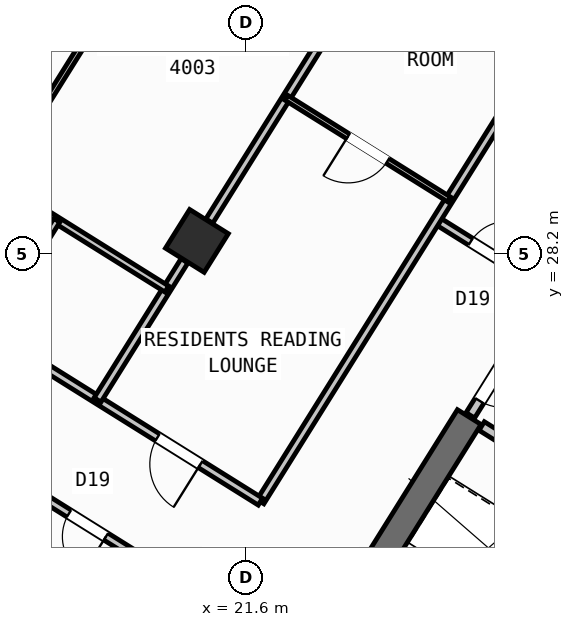
"""IFC4 building model, lengths in metres.
Left out: names, types, materials, properties, quantities, classifications, styles, units other than length and angle.
Written with IfcOpenShell. Run it as: python <this file> out.ifc"""

import sys

from ifc_helpers import new_model, si_unit, direction, frame, frame_2d, origin, origin_2d, place, context, subcontext, project, spatial, rectangle, hollow_rectangle, extrude, source, transform, mapped, element, fill, save


model = new_model("IFC4")
c1 = context("Model", 3, precision=1e-05, world=origin(), true_north=direction((0.0, 1.0)))
c2 = subcontext(c1, "Body", "Model", "MODEL_VIEW")
j1 = project(units=[si_unit("LENGTHUNIT", "METRE"), si_unit("PLANEANGLEUNIT", "RADIAN")], contexts=[c1])
p1 = place(None, origin())
s1 = spatial("IfcSite", under=j1, at=p1, CompositionType="ELEMENT")
p2 = place(p1, origin())
s2 = spatial("IfcBuilding", under=s1, at=p2, CompositionType="ELEMENT")
p3 = place(p2, frame((0.0, 0.0, 158.7)))
s3 = spatial("IfcBuildingStorey", under=s2, at=p3, CompositionType="ELEMENT", Elevation=158.7)
p4 = place(p3, frame((26.007, 24.976, 0.0), z_axis=(0.0, 0.0, 1.0), x_axis=(-0.529923795287, -0.848045264823, 0.0)))
e1 = element("IfcWall", 1, at=p4, inside=s3, PredefinedType="SHEAR", context=c2, shape_type="SweptSolid", body=[
    extrude(rectangle(XDim=6.425, YDim=0.55, at=frame_2d((3.212, 0.0))), origin(), (0.0, 0.0, 1.0), 3.35),
])
m1 = source(origin(), c2, "Body", "SweptSolid", [
    extrude(hollow_rectangle(XDim=0.9, YDim=0.9, WallThickness=0.036, at=origin_2d()), origin(), (0.0, 0.0, 1.0), 3.6),
])
p5 = place(p3, frame((20.632, 28.452, 0.0), z_axis=(0.0, 0.0, 1.0), x_axis=(-0.848048096156, 0.529919264233, 0.0)))
e2 = element("IfcColumn", 2, at=p5, inside=s3, PredefinedType="COLUMN", context=c2, shape_type="MappedRepresentation", body=[
    mapped(m1, transform((0.0, 0.0, 0.0), scale=1.0)),
])
p6 = place(p3, frame((29.268, 6.429, 0.0), z_axis=(0.0, 0.0, 1.0), x_axis=(-0.848049971435, 0.529916263149, 0.0)))
e3 = element("IfcWall", 3, at=p6, inside=s3, PredefinedType="STANDARD", context=c2, shape_type="SweptSolid", body=[
    extrude(rectangle(XDim=31.588, YDim=0.32, at=frame_2d((15.794, 0.0))), origin(), (0.0, 0.0, 1.0), 3.35),
])
p7 = place(p6, frame((16.362, 0.0, 0.0)))
e4 = element("IfcOpeningElement", 4, at=p7, cuts=e3, PredefinedType="OPENING", context=c2, shape_type="SweptSolid", body=[
    extrude(rectangle(XDim=1.2, YDim=2.15, at=frame_2d((0.6, 1.075))), frame((0.0, 0.17, 0.0), z_axis=(0.0, -1.0, 0.0), x_axis=(1.0, 0.0, 0.0)), (0.0, 0.0, 1.0), 0.34),
])
p8 = place(p6, frame((2.989, 0.0, 0.8)))
e5 = element("IfcOpeningElement", 5, at=p8, cuts=e3, PredefinedType="OPENING", context=c2, shape_type="SweptSolid", body=[
    extrude(rectangle(XDim=2.1, YDim=1.55, at=frame_2d((1.05, 0.775))), frame((0.0, 0.17, 0.0), z_axis=(0.0, -1.0, 0.0), x_axis=(1.0, 0.0, 0.0)), (0.0, 0.0, 1.0), 0.34),
])
p9 = place(p6, frame((8.359, 0.0, 0.8)))
e6 = element("IfcOpeningElement", 6, at=p9, cuts=e3, PredefinedType="OPENING", context=c2, shape_type="SweptSolid", body=[
    extrude(rectangle(XDim=2.1, YDim=1.55, at=frame_2d((1.05, 0.775))), frame((0.0, 0.17, 0.0), z_axis=(0.0, -1.0, 0.0), x_axis=(1.0, 0.0, 0.0)), (0.0, 0.0, 1.0), 0.34),
])
p10 = place(p6, frame((13.284, 0.0, 0.95)))
e7 = element("IfcOpeningElement", 7, at=p10, cuts=e3, PredefinedType="OPENING", context=c2, shape_type="SweptSolid", body=[
    extrude(rectangle(XDim=1.2, YDim=1.4, at=frame_2d((0.6, 0.7))), frame((0.0, 0.17, 0.0), z_axis=(0.0, -1.0, 0.0), x_axis=(1.0, 0.0, 0.0)), (0.0, 0.0, 1.0), 0.34),
])
p11 = place(p6, frame((20.259, 0.0, 0.95)))
e8 = element("IfcOpeningElement", 8, at=p11, cuts=e3, PredefinedType="OPENING", context=c2, shape_type="SweptSolid", body=[
    extrude(rectangle(XDim=1.2, YDim=1.4, at=frame_2d((0.6, 0.7))), frame((0.0, 0.17, 0.0), z_axis=(0.0, -1.0, 0.0), x_axis=(1.0, 0.0, 0.0)), (0.0, 0.0, 1.0), 0.34),
])
p12 = place(p6, frame((22.929, 0.0, 0.95)))
e9 = element("IfcOpeningElement", 9, at=p12, cuts=e3, PredefinedType="OPENING", context=c2, shape_type="SweptSolid", body=[
    extrude(rectangle(XDim=1.2, YDim=1.4, at=frame_2d((0.6, 0.7))), frame((0.0, 0.17, 0.0), z_axis=(0.0, -1.0, 0.0), x_axis=(1.0, 0.0, 0.0)), (0.0, 0.0, 1.0), 0.34),
])
p13 = place(p6, frame((27.481, 0.0, 0.8)))
e10 = element("IfcOpeningElement", 10, at=p13, cuts=e3, PredefinedType="OPENING", context=c2, shape_type="SweptSolid", body=[
    extrude(rectangle(XDim=2.1, YDim=1.55, at=frame_2d((1.05, 0.775))), frame((0.0, 0.17, 0.0), z_axis=(0.0, -1.0, 0.0), x_axis=(1.0, 0.0, 0.0)), (0.0, 0.0, 1.0), 0.34),
])
p14 = place(p3, frame((14.138, 41.825, 0.0), z_axis=(0.0, 0.0, 1.0), x_axis=(0.848046498049, -0.529921821731, 0.0)))
e11 = element("IfcWall", 11, at=p14, inside=s3, PredefinedType="STANDARD", context=c2, shape_type="SweptSolid", body=[
    extrude(rectangle(XDim=31.588, YDim=0.32, at=frame_2d((15.794, 0.0))), origin(), (0.0, 0.0, 1.0), 3.35),
])
p15 = place(p14, frame((9.792, 0.0, 0.0)))
e12 = element("IfcOpeningElement", 12, at=p15, cuts=e11, PredefinedType="OPENING", context=c2, shape_type="SweptSolid", body=[
    extrude(rectangle(XDim=1.05, YDim=2.15, at=frame_2d((0.525, 1.075))), frame((0.0, 0.17, 0.0), z_axis=(0.0, -1.0, 0.0), x_axis=(1.0, 0.0, 0.0)), (0.0, 0.0, 1.0), 0.34),
])
p16 = place(p14, frame((0.791, 0.0, 0.85)))
e13 = element("IfcOpeningElement", 13, at=p16, cuts=e11, PredefinedType="OPENING", context=c2, shape_type="SweptSolid", body=[
    extrude(rectangle(XDim=1.8, YDim=1.5, at=frame_2d((0.9, 0.75))), frame((0.0, 0.17, 0.0), z_axis=(0.0, -1.0, 0.0), x_axis=(1.0, 0.0, 0.0)), (0.0, 0.0, 1.0), 0.34),
])
p17 = place(p14, frame((3.996, 0.0, 0.95)))
e14 = element("IfcOpeningElement", 14, at=p17, cuts=e11, PredefinedType="OPENING", context=c2, shape_type="SweptSolid", body=[
    extrude(rectangle(XDim=1.2, YDim=1.4, at=frame_2d((0.6, 0.7))), frame((0.0, 0.17, 0.0), z_axis=(0.0, -1.0, 0.0), x_axis=(1.0, 0.0, 0.0)), (0.0, 0.0, 1.0), 0.34),
])
p18 = place(p14, frame((13.874, 0.0, 0.85)))
e15 = element("IfcOpeningElement", 15, at=p18, cuts=e11, PredefinedType="OPENING", context=c2, shape_type="SweptSolid", body=[
    extrude(rectangle(XDim=1.5, YDim=1.5, at=frame_2d((0.75, 0.75))), frame((0.0, 0.17, 0.0), z_axis=(0.0, -1.0, 0.0), x_axis=(1.0, 0.0, 0.0)), (0.0, 0.0, 1.0), 0.34),
])
p19 = place(p14, frame((17.104, 0.0, 1.0)))
e16 = element("IfcOpeningElement", 16, at=p19, cuts=e11, PredefinedType="OPENING", context=c2, shape_type="SweptSolid", body=[
    extrude(rectangle(XDim=0.9, YDim=1.25, at=frame_2d((0.45, 0.625))), frame((0.0, 0.17, 0.0), z_axis=(0.0, -1.0, 0.0), x_axis=(1.0, 0.0, 0.0)), (0.0, 0.0, 1.0), 0.34),
])
p20 = place(p14, frame((22.144, 0.0, 1.0)))
e17 = element("IfcOpeningElement", 17, at=p20, cuts=e11, PredefinedType="OPENING", context=c2, shape_type="SweptSolid", body=[
    extrude(rectangle(XDim=0.9, YDim=1.25, at=frame_2d((0.45, 0.625))), frame((0.0, 0.17, 0.0), z_axis=(0.0, -1.0, 0.0), x_axis=(1.0, 0.0, 0.0)), (0.0, 0.0, 1.0), 0.34),
])
p21 = place(p14, frame((27.744, 0.0, 1.0)))
e18 = element("IfcOpeningElement", 18, at=p21, cuts=e11, PredefinedType="OPENING", context=c2, shape_type="SweptSolid", body=[
    extrude(rectangle(XDim=0.9, YDim=1.25, at=frame_2d((0.45, 0.625))), frame((0.0, 0.17, 0.0), z_axis=(0.0, -1.0, 0.0), x_axis=(1.0, 0.0, 0.0)), (0.0, 0.0, 1.0), 0.34),
])
p22 = place(p3, frame((31.525, 21.504, 0.0), z_axis=(0.0, 0.0, 1.0), x_axis=(-0.848040211232, 0.529931882541, 0.0)))
e19 = element("IfcWall", 19, at=p22, inside=s3, PredefinedType="STANDARD", context=c2, shape_type="SweptSolid", body=[
    extrude(rectangle(XDim=6.218, YDim=0.2, at=frame_2d((3.109, 0.0))), origin(), (0.0, 0.0, 1.0), 3.34),
])
p23 = place(p22, frame((4.4, 0.0, 0.0)))
e20 = element("IfcOpeningElement", 20, at=p23, cuts=e19, PredefinedType="OPENING", context=c2, shape_type="SweptSolid", body=[
    extrude(rectangle(XDim=0.86, YDim=2.05, at=frame_2d((0.43, 1.025))), frame((0.0, 0.11, 0.0), z_axis=(0.0, -1.0, 0.0), x_axis=(1.0, 0.0, 0.0)), (0.0, 0.0, 1.0), 0.22),
])
p24 = place(p22, frame((0.35, 0.0, 0.0)))
e21 = element("IfcOpeningElement", 21, at=p24, cuts=e19, PredefinedType="OPENING", context=c2, shape_type="SweptSolid", body=[
    extrude(rectangle(XDim=0.86, YDim=2.05, at=frame_2d((0.43, 1.025))), frame((0.0, 0.11, 0.0), z_axis=(0.0, -1.0, 0.0), x_axis=(1.0, 0.0, 0.0)), (0.0, 0.0, 1.0), 0.22),
])
p25 = place(p3, frame((27.596, 27.52, 0.0), z_axis=(0.0, 0.0, 1.0), x_axis=(-0.529865479138, -0.848081702443, 0.0)))
e22 = element("IfcWall", 22, at=p25, inside=s3, PredefinedType="STANDARD", context=c2, shape_type="SweptSolid", body=[
    extrude(rectangle(XDim=2.96, YDim=0.2, at=frame_2d((1.48, 0.0))), origin(), (0.0, 0.0, 1.0), 3.34),
])
p26 = place(p25, frame((1.76, 0.0, 0.0)))
e23 = element("IfcOpeningElement", 23, at=p26, cuts=e22, PredefinedType="OPENING", context=c2, shape_type="SweptSolid", body=[
    extrude(rectangle(XDim=0.86, YDim=2.05, at=frame_2d((0.43, 1.025))), frame((0.0, 0.11, 0.0), z_axis=(0.0, -1.0, 0.0), x_axis=(1.0, 0.0, 0.0)), (0.0, 0.0, 1.0), 0.22),
])
p27 = place(p3, frame((27.57, 27.478, 0.0), z_axis=(0.0, 0.0, 1.0), x_axis=(-0.848050851465, 0.529914854792, 0.0)))
e24 = element("IfcWall", 24, at=p27, inside=s3, PredefinedType="PARTITIONING", context=c2, shape_type="SweptSolid", body=[
    extrude(rectangle(XDim=2.61, YDim=0.16, at=frame_2d((1.305, 0.0))), origin(), (0.0, 0.0, 1.0), 3.34),
])
p28 = place(p27, frame((0.95, 0.0, 0.0)))
e25 = element("IfcOpeningElement", 25, at=p28, cuts=e24, PredefinedType="OPENING", context=c2, shape_type="SweptSolid", body=[
    extrude(rectangle(XDim=0.86, YDim=2.05, at=frame_2d((0.43, 1.025))), frame((0.0, 0.09, 0.0), z_axis=(0.0, -1.0, 0.0), x_axis=(1.0, 0.0, 0.0)), (0.0, 0.0, 1.0), 0.18),
])
p29 = place(p3, frame((27.953, 33.016, 0.0), z_axis=(0.0, 0.0, 1.0), x_axis=(-0.529905022231, -0.848056995381, 0.0)))
e26 = element("IfcWall", 26, at=p29, inside=s3, PredefinedType="PARTITIONING", context=c2, shape_type="SweptSolid", body=[
    extrude(rectangle(XDim=11.45, YDim=0.16, at=frame_2d((5.725, 0.0))), origin(), (0.0, 0.0, 1.0), 3.34),
])
p30 = place(p3, frame((21.885, 23.306, 0.0), z_axis=(0.0, 0.0, 1.0), x_axis=(-0.848052408131, 0.529912363569, 0.0)))
e27 = element("IfcWall", 27, at=p30, inside=s3, PredefinedType="PARTITIONING", context=c2, shape_type="SweptSolid", body=[
    extrude(rectangle(XDim=16.73, YDim=0.16, at=frame_2d((8.365, 0.0))), origin(), (0.0, 0.0, 1.0), 3.34),
])
p31 = place(p30, frame((1.395, 0.0, 0.0)))
e28 = element("IfcOpeningElement", 28, at=p31, cuts=e27, PredefinedType="OPENING", context=c2, shape_type="SweptSolid", body=[
    extrude(rectangle(XDim=1.0, YDim=2.1, at=frame_2d((0.5, 1.05))), frame((0.0, 0.09, 0.0), z_axis=(0.0, -1.0, 0.0), x_axis=(1.0, 0.0, 0.0)), (0.0, 0.0, 1.0), 0.18),
])
p32 = place(p30, frame((7.82, 0.0, 0.0)))
e29 = element("IfcOpeningElement", 29, at=p32, cuts=e27, PredefinedType="OPENING", context=c2, shape_type="SweptSolid", body=[
    extrude(rectangle(XDim=1.0, YDim=2.1, at=frame_2d((0.5, 1.05))), frame((0.0, 0.09, 0.0), z_axis=(0.0, -1.0, 0.0), x_axis=(1.0, 0.0, 0.0)), (0.0, 0.0, 1.0), 0.18),
])
p33 = place(p30, frame((11.14, 0.0, 0.0)))
e30 = element("IfcOpeningElement", 30, at=p33, cuts=e27, PredefinedType="OPENING", context=c2, shape_type="SweptSolid", body=[
    extrude(rectangle(XDim=1.0, YDim=2.1, at=frame_2d((0.5, 1.05))), frame((0.0, 0.09, 0.0), z_axis=(0.0, -1.0, 0.0), x_axis=(1.0, 0.0, 0.0)), (0.0, 0.0, 1.0), 0.18),
])
p34 = place(p3, frame((20.719, 21.44, 0.0), z_axis=(0.0, 0.0, 1.0), x_axis=(-0.848048310262, 0.529918921593, 0.0)))
e31 = element("IfcWall", 31, at=p34, inside=s3, PredefinedType="PARTITIONING", context=c2, shape_type="SweptSolid", body=[
    extrude(rectangle(XDim=16.73, YDim=0.16, at=frame_2d((8.365, 0.0))), origin(), (0.0, 0.0, 1.0), 3.34),
])
p35 = place(p34, frame((2.22, 0.0, 0.0)))
e32 = element("IfcOpeningElement", 32, at=p35, cuts=e31, PredefinedType="OPENING", context=c2, shape_type="SweptSolid", body=[
    extrude(rectangle(XDim=0.86, YDim=2.05, at=frame_2d((0.43, 1.025))), frame((0.0, 0.09, 0.0), z_axis=(0.0, -1.0, 0.0), x_axis=(1.0, 0.0, 0.0)), (0.0, 0.0, 1.0), 0.18),
])
p36 = place(p34, frame((6.49, 0.0, 0.0)))
e33 = element("IfcOpeningElement", 33, at=p36, cuts=e31, PredefinedType="OPENING", context=c2, shape_type="SweptSolid", body=[
    extrude(rectangle(XDim=1.0, YDim=2.1, at=frame_2d((0.5, 1.05))), frame((0.0, 0.09, 0.0), z_axis=(0.0, -1.0, 0.0), x_axis=(1.0, 0.0, 0.0)), (0.0, 0.0, 1.0), 0.18),
])
p37 = place(p34, frame((14.304, 0.0, 0.0)))
e34 = element("IfcOpeningElement", 34, at=p37, cuts=e31, PredefinedType="OPENING", context=c2, shape_type="SweptSolid", body=[
    extrude(rectangle(XDim=1.0, YDim=2.1, at=frame_2d((0.5, 1.05))), frame((0.0, 0.09, 0.0), z_axis=(0.0, -1.0, 0.0), x_axis=(1.0, 0.0, 0.0)), (0.0, 0.0, 1.0), 0.18),
])
p38 = place(p3, frame((24.256, 34.251, 0.0), z_axis=(0.0, 0.0, 1.0), x_axis=(-0.529919772691, -0.848047778437, 0.0)))
e35 = element("IfcWall", 35, at=p38, inside=s3, PredefinedType="PARTITIONING", context=c2, shape_type="SweptSolid", body=[
    extrude(rectangle(XDim=6.376, YDim=0.16, at=frame_2d((3.188, 0.0))), origin(), (0.0, 0.0, 1.0), 2.775),
])
p39 = place(p3, frame((20.387, 28.06, 0.0), z_axis=(0.0, 0.0, 1.0), x_axis=(-0.529890499457, -0.848066069705, 0.0)))
e36 = element("IfcWall", 36, at=p39, inside=s3, PredefinedType="PARTITIONING", context=c2, shape_type="SweptSolid", body=[
    extrude(rectangle(XDim=3.238, YDim=0.16, at=frame_2d((1.619, 0.0))), origin(), (0.0, 0.0, 1.0), 2.775),
])
p40 = place(p3, frame((25.612, 29.269, 0.0), z_axis=(0.0, 0.0, 1.0), x_axis=(-0.84803087207, 0.529946827537, 0.0)))
e37 = element("IfcWall", 37, at=p40, inside=s3, PredefinedType="PARTITIONING", context=c2, shape_type="SweptSolid", body=[
    extrude(rectangle(XDim=3.79, YDim=0.11, at=frame_2d((1.895, 0.0))), origin(), (0.0, 0.0, 1.0), 3.34),
])
p41 = place(p40, frame((1.435, 0.0, 0.0)))
e38 = element("IfcOpeningElement", 38, at=p41, cuts=e37, PredefinedType="OPENING", context=c2, shape_type="SweptSolid", body=[
    extrude(rectangle(XDim=0.92, YDim=2.08, at=frame_2d((0.46, 1.04))), frame((0.0, 0.065, 0.0), z_axis=(0.0, -1.0, 0.0), x_axis=(1.0, 0.0, 0.0)), (0.0, 0.0, 1.0), 0.13),
])
p42 = place(p3, frame((20.039, 27.502, 0.0), z_axis=(0.0, 0.0, 1.0), x_axis=(-0.848039019877, 0.529933789039, 0.0)))
e39 = element("IfcWall", 39, at=p42, inside=s3, PredefinedType="PLUMBINGWALL", context=c2, shape_type="SweptSolid", body=[
    extrude(rectangle(XDim=6.4, YDim=0.14, at=frame_2d((3.2, 0.0))), origin(), (0.0, 0.0, 1.0), 3.34),
])
p43 = place(p42, frame((2.824, 0.0, 0.0)))
e40 = element("IfcOpeningElement", 40, at=p43, cuts=e39, PredefinedType="OPENING", context=c2, shape_type="SweptSolid", body=[
    extrude(rectangle(XDim=0.78, YDim=2.05, at=frame_2d((0.39, 1.025))), frame((0.0, 0.08, 0.0), z_axis=(0.0, -1.0, 0.0), x_axis=(1.0, 0.0, 0.0)), (0.0, 0.0, 1.0), 0.16),
])
p44 = place(p3, frame((17.867, 28.859, 0.0), z_axis=(0.0, 0.0, 1.0), x_axis=(-0.529913878929, -0.848051461244, 0.0)))
e41 = element("IfcWall", 41, at=p44, inside=s3, PredefinedType="PLUMBINGWALL", context=c2, shape_type="SweptSolid", body=[
    extrude(rectangle(XDim=2.58, YDim=0.14, at=frame_2d((1.29, 0.0))), origin(), (0.0, 0.0, 1.0), 3.34),
])
p45 = place(p44, frame((0.9, 0.0, 0.0)))
e42 = element("IfcOpeningElement", 42, at=p45, cuts=e41, PredefinedType="OPENING", context=c2, shape_type="SweptSolid", body=[
    extrude(rectangle(XDim=0.78, YDim=2.05, at=frame_2d((0.39, 1.025))), frame((0.0, 0.08, 0.0), z_axis=(0.0, -1.0, 0.0), x_axis=(1.0, 0.0, 0.0)), (0.0, 0.0, 1.0), 0.16),
])
p46 = place(p3, frame((21.517, 37.356, 0.0), z_axis=(0.0, 0.0, 1.0), x_axis=(-0.529919705034, -0.848047820713, 0.0)))
e43 = element("IfcWall", 43, at=p46, inside=s3, PredefinedType="PARTITIONING", context=c2, shape_type="SweptSolid", body=[
    extrude(rectangle(XDim=9.14, YDim=0.11, at=frame_2d((4.57, 0.0))), origin(), (0.0, 0.0, 1.0), 3.34),
])
p47 = place(p46, frame((0.47, 0.0, 0.0)))
e44 = element("IfcOpeningElement", 44, at=p47, cuts=e43, PredefinedType="OPENING", context=c2, shape_type="SweptSolid", body=[
    extrude(rectangle(XDim=0.92, YDim=2.08, at=frame_2d((0.46, 1.04))), frame((0.0, 0.065, 0.0), z_axis=(0.0, -1.0, 0.0), x_axis=(1.0, 0.0, 0.0)), (0.0, 0.0, 1.0), 0.13),
])
m2 = source(origin(), c2, "Body", "SweptSolid", [
    extrude(rectangle(XDim=0.86, YDim=2.05, at=frame_2d((0.43, 1.025))), frame((0.0, 0.025, 0.0), z_axis=(0.0, -1.0, 0.0), x_axis=(1.0, 0.0, 0.0)), (0.0, 0.0, 1.0), 0.05),
])
p48 = place(p28, frame((0.86, 0.0, 0.0), z_axis=(0.0, 0.0, 1.0), x_axis=(-1.0, 0.0, 0.0)))
e45 = element("IfcDoor", 45, at=p48, inside=s3, OperationType="SINGLE_SWING_RIGHT", PredefinedType="DOOR", context=c2, shape_type="MappedRepresentation", body=[
    mapped(m2, transform((0.0, 0.0, 0.0), scale=1.0)),
])
fill(e25, e45)
p49 = place(p26, origin())
e46 = element("IfcDoor", 46, at=p49, inside=s3, OperationType="SINGLE_SWING_LEFT", PredefinedType="DOOR", context=c2, shape_type="MappedRepresentation", body=[
    mapped(m2, transform((0.0, 0.0, 0.0), scale=1.0)),
])
fill(e23, e46)
p50 = place(p35, origin())
e47 = element("IfcDoor", 47, at=p50, inside=s3, OperationType="SINGLE_SWING_LEFT", PredefinedType="DOOR", context=c2, shape_type="MappedRepresentation", body=[
    mapped(m2, transform((0.0, 0.0, 0.0), scale=1.0)),
])
fill(e32, e47)
m3 = source(origin(), c2, "Body", "SweptSolid", [
    extrude(rectangle(XDim=1.0, YDim=2.1, at=frame_2d((0.5, 1.05))), frame((0.0, 0.025, 0.0), z_axis=(0.0, -1.0, 0.0), x_axis=(1.0, 0.0, 0.0)), (0.0, 0.0, 1.0), 0.05),
])
p51 = place(p31, origin())
e48 = element("IfcDoor", 48, at=p51, inside=s3, OperationType="SINGLE_SWING_LEFT", PredefinedType="DOOR", context=c2, shape_type="MappedRepresentation", body=[
    mapped(m3, transform((0.0, 0.0, 0.0), scale=1.0)),
])
fill(e28, e48)
m4 = source(origin(), c2, "Body", "SweptSolid", [
    extrude(rectangle(XDim=0.92, YDim=2.08, at=frame_2d((0.46, 1.04))), frame((0.0, 0.025, 0.0), z_axis=(0.0, -1.0, 0.0), x_axis=(1.0, 0.0, 0.0)), (0.0, 0.0, 1.0), 0.05),
])
p52 = place(p41, origin())
e49 = element("IfcDoor", 49, at=p52, inside=s3, OperationType="SINGLE_SWING_RIGHT", PredefinedType="DOOR", context=c2, shape_type="MappedRepresentation", body=[
    mapped(m4, transform((0.0, 0.0, 0.0), scale=1.0)),
])
fill(e38, e49)
save(model, sys.argv[1])
